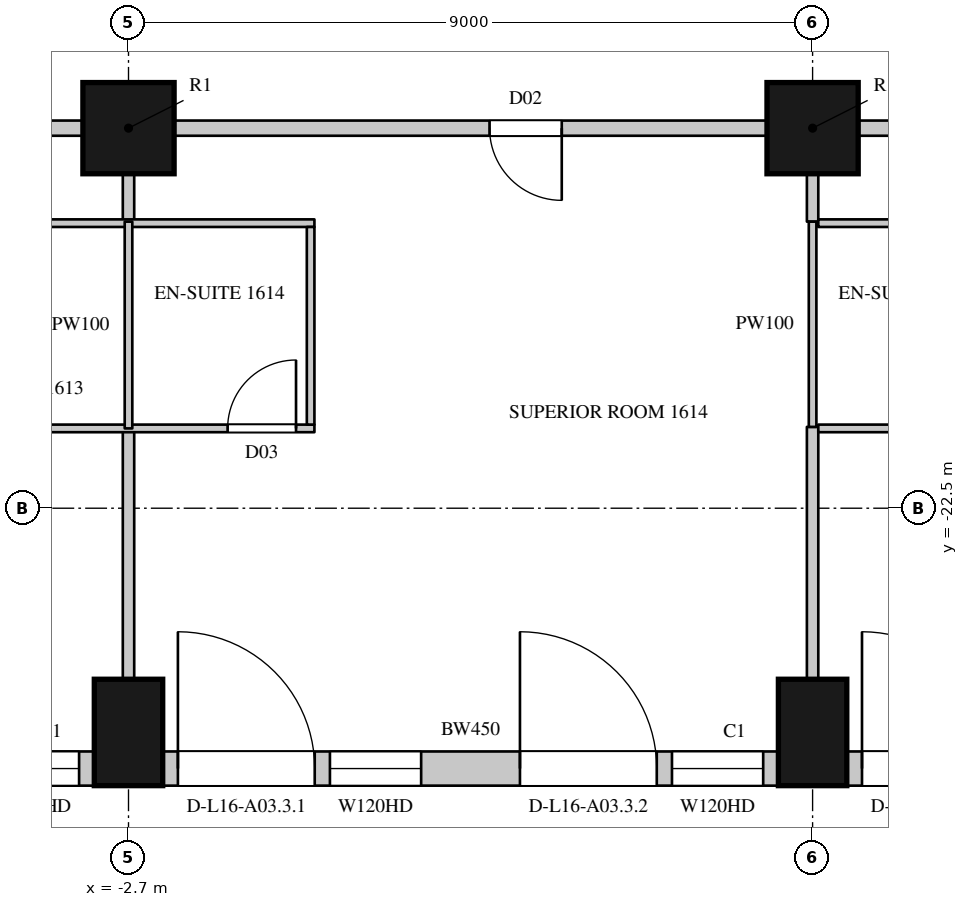
"""IFC4 building model, lengths in metres.
Left out: names, types, materials, properties, quantities, classifications, styles, units other than length and angle.
Written with IfcOpenShell. Run it as: python <this file> out.ifc"""

import sys

from ifc_helpers import new_model, si_unit, direction, frame, frame_2d, origin, origin_2d, place, context, subcontext, project, spatial, rectangle, circle, extrude, element, fill, save


model = new_model("IFC4")
c1 = context("Model", 3, precision=1e-05, world=origin(), true_north=direction((0.0, 1.0)))
c2 = subcontext(c1, "Body", "Model", "MODEL_VIEW")
j1 = project(units=[si_unit("LENGTHUNIT", "METRE"), si_unit("PLANEANGLEUNIT", "RADIAN")], contexts=[c1])
p1 = place(None, origin())
s1 = spatial("IfcSite", under=j1, at=p1, CompositionType="ELEMENT")
p2 = place(p1, origin())
s2 = spatial("IfcBuilding", under=s1, at=p2, CompositionType="ELEMENT")
p3 = place(p2, frame((0.0, 0.0, 87.9)))
s3 = spatial("IfcBuildingStorey", under=s2, at=p3, CompositionType="ELEMENT", Elevation=87.9)
for number, where, z_axis, x_axis in (
    (1, (-2.7, -25.45, 0.0), (0.0, 0.0, 1.0), (1.0, 0.0, 0.0)),
    (2, (6.3, -25.45, 0.0), (0.0, 0.0, 1.0), (1.0, 0.0, 0.0)),
):
    element("IfcColumn", number, at=place(p3, frame(where, z_axis=z_axis, x_axis=x_axis)), inside=s3, PredefinedType="COLUMN", context=c2, shape_type="SweptSolid", body=[
        extrude(rectangle(XDim=0.9, YDim=1.4, at=origin_2d()), origin(), (0.0, 0.0, 1.0), 3.6),
    ])
for number, where, z_axis, x_axis in (
    (3, (-2.7, -17.5, 0.0), (0.0, 0.0, 1.0), (1.0, 0.0, 0.0)),
    (4, (6.3, -17.5, 0.0), (0.0, 0.0, 1.0), (1.0, 0.0, 0.0)),
):
    element("IfcColumn", number, at=place(p3, frame(where, z_axis=z_axis, x_axis=x_axis)), inside=s3, PredefinedType="COLUMN", context=c2, shape_type="SweptSolid", body=[
        extrude(circle(Radius=0.6, at=origin_2d()), origin(), (0.0, 0.0, 1.0), 3.6),
    ])
p4 = place(p3, frame((-11.25, -25.925, 0.0), z_axis=(0.0, 0.0, 1.0), x_axis=(1.0, 0.0, 0.0)))
e5 = element("IfcWall", 5, at=p4, inside=s3, PredefinedType="SOLIDWALL", context=c2, shape_type="SweptSolid", body=[
    extrude(rectangle(XDim=8.1, YDim=0.45, at=frame_2d((4.05, 0.0))), origin(), (0.0, 0.0, 1.0), 3.3),
])
p5 = place(p4, frame((0.2, 0.0, 0.0)))
e6 = element("IfcOpeningElement", 6, at=p5, cuts=e5, PredefinedType="OPENING", context=c2, shape_type="SweptSolid", body=[
    extrude(rectangle(XDim=1.8, YDim=2.4, at=frame_2d((0.9, 1.2))), frame((0.0, 0.235, 0.0), z_axis=(0.0, -1.0, 0.0), x_axis=(1.0, 0.0, 0.0)), (0.0, 0.0, 1.0), 0.47),
])
p6 = place(p4, frame((2.2, 0.0, 1.05)))
e7 = element("IfcOpeningElement", 7, at=p6, cuts=e5, PredefinedType="OPENING", context=c2, shape_type="SweptSolid", body=[
    extrude(rectangle(XDim=1.2, YDim=2.0, at=frame_2d((0.6, 1.0))), frame((0.0, 0.235, 0.0), z_axis=(0.0, -1.0, 0.0), x_axis=(1.0, 0.0, 0.0)), (0.0, 0.0, 1.0), 0.47),
])
p7 = place(p4, frame((4.7, 0.0, 0.0)))
e8 = element("IfcOpeningElement", 8, at=p7, cuts=e5, PredefinedType="OPENING", context=c2, shape_type="SweptSolid", body=[
    extrude(rectangle(XDim=1.8, YDim=2.4, at=frame_2d((0.9, 1.2))), frame((0.0, 0.235, 0.0), z_axis=(0.0, -1.0, 0.0), x_axis=(1.0, 0.0, 0.0)), (0.0, 0.0, 1.0), 0.47),
])
p8 = place(p4, frame((6.7, 0.0, 1.05)))
e9 = element("IfcOpeningElement", 9, at=p8, cuts=e5, PredefinedType="OPENING", context=c2, shape_type="SweptSolid", body=[
    extrude(rectangle(XDim=1.2, YDim=2.0, at=frame_2d((0.6, 1.0))), frame((0.0, 0.235, 0.0), z_axis=(0.0, -1.0, 0.0), x_axis=(1.0, 0.0, 0.0)), (0.0, 0.0, 1.0), 0.47),
])
p9 = place(p3, frame((-2.25, -25.925, 0.0), z_axis=(0.0, 0.0, 1.0), x_axis=(1.0, 0.0, 0.0)))
e10 = element("IfcWall", 10, at=p9, inside=s3, PredefinedType="SOLIDWALL", context=c2, shape_type="SweptSolid", body=[
    extrude(rectangle(XDim=8.1, YDim=0.45, at=frame_2d((4.05, 0.0))), origin(), (0.0, 0.0, 1.0), 3.3),
])
p10 = place(p9, frame((0.2, 0.0, 0.0)))
e11 = element("IfcOpeningElement", 11, at=p10, cuts=e10, PredefinedType="OPENING", context=c2, shape_type="SweptSolid", body=[
    extrude(rectangle(XDim=1.8, YDim=2.4, at=frame_2d((0.9, 1.2))), frame((0.0, 0.235, 0.0), z_axis=(0.0, -1.0, 0.0), x_axis=(1.0, 0.0, 0.0)), (0.0, 0.0, 1.0), 0.47),
])
p11 = place(p9, frame((2.2, 0.0, 1.05)))
e12 = element("IfcOpeningElement", 12, at=p11, cuts=e10, PredefinedType="OPENING", context=c2, shape_type="SweptSolid", body=[
    extrude(rectangle(XDim=1.2, YDim=2.0, at=frame_2d((0.6, 1.0))), frame((0.0, 0.235, 0.0), z_axis=(0.0, -1.0, 0.0), x_axis=(1.0, 0.0, 0.0)), (0.0, 0.0, 1.0), 0.47),
])
p12 = place(p9, frame((4.7, 0.0, 0.0)))
e13 = element("IfcOpeningElement", 13, at=p12, cuts=e10, PredefinedType="OPENING", context=c2, shape_type="SweptSolid", body=[
    extrude(rectangle(XDim=1.8, YDim=2.4, at=frame_2d((0.9, 1.2))), frame((0.0, 0.235, 0.0), z_axis=(0.0, -1.0, 0.0), x_axis=(1.0, 0.0, 0.0)), (0.0, 0.0, 1.0), 0.47),
])
p13 = place(p9, frame((6.7, 0.0, 1.05)))
e14 = element("IfcOpeningElement", 14, at=p13, cuts=e10, PredefinedType="OPENING", context=c2, shape_type="SweptSolid", body=[
    extrude(rectangle(XDim=1.2, YDim=2.0, at=frame_2d((0.6, 1.0))), frame((0.0, 0.235, 0.0), z_axis=(0.0, -1.0, 0.0), x_axis=(1.0, 0.0, 0.0)), (0.0, 0.0, 1.0), 0.47),
])
p14 = place(p3, frame((6.75, -25.925, 0.0), z_axis=(0.0, 0.0, 1.0), x_axis=(1.0, 0.0, 0.0)))
e15 = element("IfcWall", 15, at=p14, inside=s3, PredefinedType="SOLIDWALL", context=c2, shape_type="SweptSolid", body=[
    extrude(rectangle(XDim=8.1, YDim=0.45, at=frame_2d((4.05, 0.0))), origin(), (0.0, 0.0, 1.0), 3.3),
])
p15 = place(p14, frame((0.2, 0.0, 0.0)))
e16 = element("IfcOpeningElement", 16, at=p15, cuts=e15, PredefinedType="OPENING", context=c2, shape_type="SweptSolid", body=[
    extrude(rectangle(XDim=1.8, YDim=2.4, at=frame_2d((0.9, 1.2))), frame((0.0, 0.235, 0.0), z_axis=(0.0, -1.0, 0.0), x_axis=(1.0, 0.0, 0.0)), (0.0, 0.0, 1.0), 0.47),
])
p16 = place(p14, frame((2.2, 0.0, 1.05)))
e17 = element("IfcOpeningElement", 17, at=p16, cuts=e15, PredefinedType="OPENING", context=c2, shape_type="SweptSolid", body=[
    extrude(rectangle(XDim=1.2, YDim=2.0, at=frame_2d((0.6, 1.0))), frame((0.0, 0.235, 0.0), z_axis=(0.0, -1.0, 0.0), x_axis=(1.0, 0.0, 0.0)), (0.0, 0.0, 1.0), 0.47),
])
p17 = place(p14, frame((5.4, 0.0, 0.0)))
e18 = element("IfcOpeningElement", 18, at=p17, cuts=e15, PredefinedType="OPENING", context=c2, shape_type="SweptSolid", body=[
    extrude(rectangle(XDim=1.8, YDim=2.4, at=frame_2d((0.9, 1.2))), frame((0.0, 0.235, 0.0), z_axis=(0.0, -1.0, 0.0), x_axis=(1.0, 0.0, 0.0)), (0.0, 0.0, 1.0), 0.47),
])
p18 = place(p3, frame((-11.1, -17.5, 0.0), z_axis=(0.0, 0.0, 1.0), x_axis=(1.0, 0.0, 0.0)))
e19 = element("IfcWall", 19, at=p18, inside=s3, PredefinedType="PARTITIONING", context=c2, shape_type="SweptSolid", body=[
    extrude(rectangle(XDim=7.8, YDim=0.2, at=frame_2d((3.9, 0.0))), origin(), (0.0, 0.0, 1.0), 2.75),
])
p19 = place(p18, frame((4.2, 0.0, 0.0)))
e20 = element("IfcOpeningElement", 20, at=p19, cuts=e19, PredefinedType="OPENING", context=c2, shape_type="SweptSolid", body=[
    extrude(rectangle(XDim=0.95, YDim=2.2, at=frame_2d((0.475, 1.1))), frame((0.0, 0.11, 0.0), z_axis=(0.0, -1.0, 0.0), x_axis=(1.0, 0.0, 0.0)), (0.0, 0.0, 1.0), 0.22),
])
p20 = place(p3, frame((-2.1, -17.5, 0.0), z_axis=(0.0, 0.0, 1.0), x_axis=(1.0, 0.0, 0.0)))
e21 = element("IfcWall", 21, at=p20, inside=s3, PredefinedType="PARTITIONING", context=c2, shape_type="SweptSolid", body=[
    extrude(rectangle(XDim=7.8, YDim=0.2, at=frame_2d((3.9, 0.0))), origin(), (0.0, 0.0, 1.0), 2.75),
])
p21 = place(p20, frame((4.15, 0.0, 0.0)))
e22 = element("IfcOpeningElement", 22, at=p21, cuts=e21, PredefinedType="OPENING", context=c2, shape_type="SweptSolid", body=[
    extrude(rectangle(XDim=0.95, YDim=2.2, at=frame_2d((0.475, 1.1))), frame((0.0, 0.11, 0.0), z_axis=(0.0, -1.0, 0.0), x_axis=(1.0, 0.0, 0.0)), (0.0, 0.0, 1.0), 0.22),
])
p22 = place(p3, frame((6.9, -17.5, 0.0), z_axis=(0.0, 0.0, 1.0), x_axis=(1.0, 0.0, 0.0)))
e23 = element("IfcWall", 23, at=p22, inside=s3, PredefinedType="PARTITIONING", context=c2, shape_type="SweptSolid", body=[
    extrude(rectangle(XDim=7.8, YDim=0.2, at=frame_2d((3.9, 0.0))), origin(), (0.0, 0.0, 1.0), 2.75),
])
p23 = place(p22, frame((2.4, 0.0, 0.0)))
e24 = element("IfcOpeningElement", 24, at=p23, cuts=e23, PredefinedType="OPENING", context=c2, shape_type="SweptSolid", body=[
    extrude(rectangle(XDim=0.95, YDim=2.2, at=frame_2d((0.475, 1.1))), frame((0.0, 0.11, 0.0), z_axis=(0.0, -1.0, 0.0), x_axis=(1.0, 0.0, 0.0)), (0.0, 0.0, 1.0), 0.22),
])
p24 = place(p22, frame((4.85, 0.0, 0.0)))
e25 = element("IfcOpeningElement", 25, at=p24, cuts=e23, PredefinedType="OPENING", context=c2, shape_type="SweptSolid", body=[
    extrude(rectangle(XDim=0.95, YDim=2.2, at=frame_2d((0.475, 1.1))), frame((0.0, 0.11, 0.0), z_axis=(0.0, -1.0, 0.0), x_axis=(1.0, 0.0, 0.0)), (0.0, 0.0, 1.0), 0.22),
])
p25 = place(p3, frame((-2.7, -24.75, 0.0), z_axis=(0.0, 0.0, 1.0), x_axis=(0.0, 1.0, 0.0)))
e26 = element("IfcWall", 26, at=p25, inside=s3, PredefinedType="PARTITIONING", context=c2, shape_type="SweptSolid", body=[
    extrude(rectangle(XDim=3.3, YDim=0.15, at=frame_2d((1.65, 0.0))), origin(), (0.0, 0.0, 1.0), 2.75),
])
p26 = place(p3, frame((-2.7, -18.73, 0.0), z_axis=(0.0, 0.0, 1.0), x_axis=(0.0, 1.0, 0.0)))
e27 = element("IfcWall", 27, at=p26, inside=s3, PredefinedType="PARTITIONING", context=c2, shape_type="SweptSolid", body=[
    extrude(rectangle(XDim=0.63, YDim=0.15, at=frame_2d((0.315, 0.0))), origin(), (0.0, 0.0, 1.0), 2.75),
])
p27 = place(p3, frame((6.3, -24.75, 0.0), z_axis=(0.0, 0.0, 1.0), x_axis=(0.0, 1.0, 0.0)))
e28 = element("IfcWall", 28, at=p27, inside=s3, PredefinedType="PARTITIONING", context=c2, shape_type="SweptSolid", body=[
    extrude(rectangle(XDim=3.32, YDim=0.15, at=frame_2d((1.66, 0.0))), origin(), (0.0, 0.0, 1.0), 2.75),
])
p28 = place(p3, frame((6.3, -18.73, 0.0), z_axis=(0.0, 0.0, 1.0), x_axis=(0.0, 1.0, 0.0)))
e29 = element("IfcWall", 29, at=p28, inside=s3, PredefinedType="PARTITIONING", context=c2, shape_type="SweptSolid", body=[
    extrude(rectangle(XDim=0.63, YDim=0.15, at=frame_2d((0.315, 0.0))), origin(), (0.0, 0.0, 1.0), 2.75),
])
p29 = place(p3, frame((-5.646, -21.45, 0.0), z_axis=(0.0, 0.0, 1.0), x_axis=(1.0, 0.0, 0.0)))
e30 = element("IfcWall", 30, at=p29, inside=s3, PredefinedType="PARTITIONING", context=c2, shape_type="SweptSolid", body=[
    extrude(rectangle(XDim=5.392, YDim=0.1, at=frame_2d((2.696, 0.0))), origin(), (0.0, 0.0, 1.0), 3.3),
])
p30 = place(p29, frame((4.25, 0.0, 0.0)))
e31 = element("IfcOpeningElement", 31, at=p30, cuts=e30, PredefinedType="OPENING", context=c2, shape_type="SweptSolid", body=[
    extrude(rectangle(XDim=0.9, YDim=2.2, at=frame_2d((0.45, 1.1))), frame((0.0, 0.06, 0.0), z_axis=(0.0, -1.0, 0.0), x_axis=(1.0, 0.0, 0.0)), (0.0, 0.0, 1.0), 0.12),
])
p31 = place(p3, frame((-5.646, -18.75, 0.0), z_axis=(0.0, 0.0, 1.0), x_axis=(1.0, 0.0, 0.0)))
e32 = element("IfcWall", 32, at=p31, inside=s3, PredefinedType="PARTITIONING", context=c2, shape_type="SweptSolid", body=[
    extrude(rectangle(XDim=5.392, YDim=0.1, at=frame_2d((2.696, 0.0))), origin(), (0.0, 0.0, 1.0), 3.3),
])
p32 = place(p3, frame((-2.7, -21.45, 0.0), z_axis=(0.0, 0.0, 1.0), x_axis=(0.0, 1.0, 0.0)))
e33 = element("IfcWall", 33, at=p32, inside=s3, PredefinedType="PARTITIONING", context=c2, shape_type="SweptSolid", body=[
    extrude(rectangle(XDim=2.72, YDim=0.1, at=frame_2d((1.36, 0.0))), origin(), (0.0, 0.0, 1.0), 2.75),
])
p33 = place(p3, frame((-0.304, -21.4, 0.0), z_axis=(0.0, 0.0, 1.0), x_axis=(0.0, 1.0, 0.0)))
e34 = element("IfcWall", 34, at=p33, inside=s3, PredefinedType="PARTITIONING", context=c2, shape_type="SweptSolid", body=[
    extrude(rectangle(XDim=2.6, YDim=0.1, at=frame_2d((1.3, 0.0))), origin(), (0.0, 0.0, 1.0), 3.3),
])
p34 = place(p3, frame((6.3, -21.43, 0.0), z_axis=(0.0, 0.0, 1.0), x_axis=(0.0, 1.0, 0.0)))
e35 = element("IfcWall", 35, at=p34, inside=s3, PredefinedType="PARTITIONING", context=c2, shape_type="SweptSolid", body=[
    extrude(rectangle(XDim=2.7, YDim=0.1, at=frame_2d((1.35, 0.0))), origin(), (0.0, 0.0, 1.0), 2.75),
])
p35 = place(p3, frame((6.375, -21.45, 0.0), z_axis=(0.0, 0.0, 1.0), x_axis=(1.0, 0.0, 0.0)))
e36 = element("IfcWall", 36, at=p35, inside=s3, PredefinedType="PARTITIONING", context=c2, shape_type="SweptSolid", body=[
    extrude(rectangle(XDim=2.371, YDim=0.1, at=frame_2d((1.186, 0.0))), origin(), (0.0, 0.0, 1.0), 3.3),
])
p36 = place(p35, frame((1.25, 0.0, 0.0)))
e37 = element("IfcOpeningElement", 37, at=p36, cuts=e36, PredefinedType="OPENING", context=c2, shape_type="SweptSolid", body=[
    extrude(rectangle(XDim=0.9, YDim=2.2, at=frame_2d((0.45, 1.1))), frame((0.0, 0.06, 0.0), z_axis=(0.0, -1.0, 0.0), x_axis=(1.0, 0.0, 0.0)), (0.0, 0.0, 1.0), 0.12),
])
p37 = place(p3, frame((6.375, -18.75, 0.0), z_axis=(0.0, 0.0, 1.0), x_axis=(1.0, 0.0, 0.0)))
e38 = element("IfcWall", 38, at=p37, inside=s3, PredefinedType="PARTITIONING", context=c2, shape_type="SweptSolid", body=[
    extrude(rectangle(XDim=2.371, YDim=0.1, at=frame_2d((1.186, 0.0))), origin(), (0.0, 0.0, 1.0), 3.3),
])
p38 = place(p8, origin())
e39 = element("IfcWindow", 39, at=p38, inside=s3, PartitioningType="SINGLE_PANEL", PredefinedType="WINDOW", context=c2, shape_type="SweptSolid", body=[
    extrude(rectangle(XDim=1.2, YDim=2.0, at=frame_2d((0.6, 1.0))), frame((0.0, 0.135, 0.0), z_axis=(0.0, -1.0, 0.0), x_axis=(1.0, 0.0, 0.0)), (0.0, 0.0, 1.0), 0.06),
])
fill(e9, e39)
p39 = place(p10, origin())
e40 = element("IfcDoor", 40, at=p39, inside=s3, OperationType="SLIDING_TO_LEFT", PredefinedType="DOOR", context=c2, shape_type="SweptSolid", body=[
    extrude(rectangle(XDim=1.8, YDim=2.4, at=frame_2d((0.9, 1.2))), frame((0.0, 0.13, 0.0), z_axis=(0.0, -1.0, 0.0), x_axis=(1.0, 0.0, 0.0)), (0.0, 0.0, 1.0), 0.05),
])
fill(e11, e40)
p40 = place(p11, origin())
e41 = element("IfcWindow", 41, at=p40, inside=s3, PartitioningType="SINGLE_PANEL", PredefinedType="WINDOW", context=c2, shape_type="SweptSolid", body=[
    extrude(rectangle(XDim=1.2, YDim=2.0, at=frame_2d((0.6, 1.0))), frame((0.0, 0.135, 0.0), z_axis=(0.0, -1.0, 0.0), x_axis=(1.0, 0.0, 0.0)), (0.0, 0.0, 1.0), 0.06),
])
fill(e12, e41)
p41 = place(p12, origin())
e42 = element("IfcDoor", 42, at=p41, inside=s3, OperationType="SLIDING_TO_LEFT", PredefinedType="DOOR", context=c2, shape_type="SweptSolid", body=[
    extrude(rectangle(XDim=1.8, YDim=2.4, at=frame_2d((0.9, 1.2))), frame((0.0, 0.13, 0.0), z_axis=(0.0, -1.0, 0.0), x_axis=(1.0, 0.0, 0.0)), (0.0, 0.0, 1.0), 0.05),
])
fill(e13, e42)
p42 = place(p13, origin())
e43 = element("IfcWindow", 43, at=p42, inside=s3, PartitioningType="SINGLE_PANEL", PredefinedType="WINDOW", context=c2, shape_type="SweptSolid", body=[
    extrude(rectangle(XDim=1.2, YDim=2.0, at=frame_2d((0.6, 1.0))), frame((0.0, 0.135, 0.0), z_axis=(0.0, -1.0, 0.0), x_axis=(1.0, 0.0, 0.0)), (0.0, 0.0, 1.0), 0.06),
])
fill(e14, e43)
p43 = place(p15, origin())
e44 = element("IfcDoor", 44, at=p43, inside=s3, OperationType="SLIDING_TO_LEFT", PredefinedType="DOOR", context=c2, shape_type="SweptSolid", body=[
    extrude(rectangle(XDim=1.8, YDim=2.4, at=frame_2d((0.9, 1.2))), frame((0.0, 0.13, 0.0), z_axis=(0.0, -1.0, 0.0), x_axis=(1.0, 0.0, 0.0)), (0.0, 0.0, 1.0), 0.05),
])
fill(e16, e44)
p44 = place(p21, origin())
e45 = element("IfcDoor", 45, at=p44, inside=s3, OperationType="SINGLE_SWING_LEFT", PredefinedType="DOOR", context=c2, shape_type="SweptSolid", body=[
    extrude(rectangle(XDim=0.95, YDim=2.2, at=frame_2d((0.475, 1.1))), frame((0.0, 0.025, 0.0), z_axis=(0.0, -1.0, 0.0), x_axis=(1.0, 0.0, 0.0)), (0.0, 0.0, 1.0), 0.05),
])
fill(e22, e45)
p45 = place(p30, origin())
e46 = element("IfcDoor", 46, at=p45, inside=s3, OperationType="SINGLE_SWING_RIGHT", PredefinedType="DOOR", context=c2, shape_type="SweptSolid", body=[
    extrude(rectangle(XDim=0.9, YDim=2.2, at=frame_2d((0.45, 1.1))), frame((0.0, 0.025, 0.0), z_axis=(0.0, -1.0, 0.0), x_axis=(1.0, 0.0, 0.0)), (0.0, 0.0, 1.0), 0.05),
])
fill(e31, e46)
save(model, sys.argv[1])
